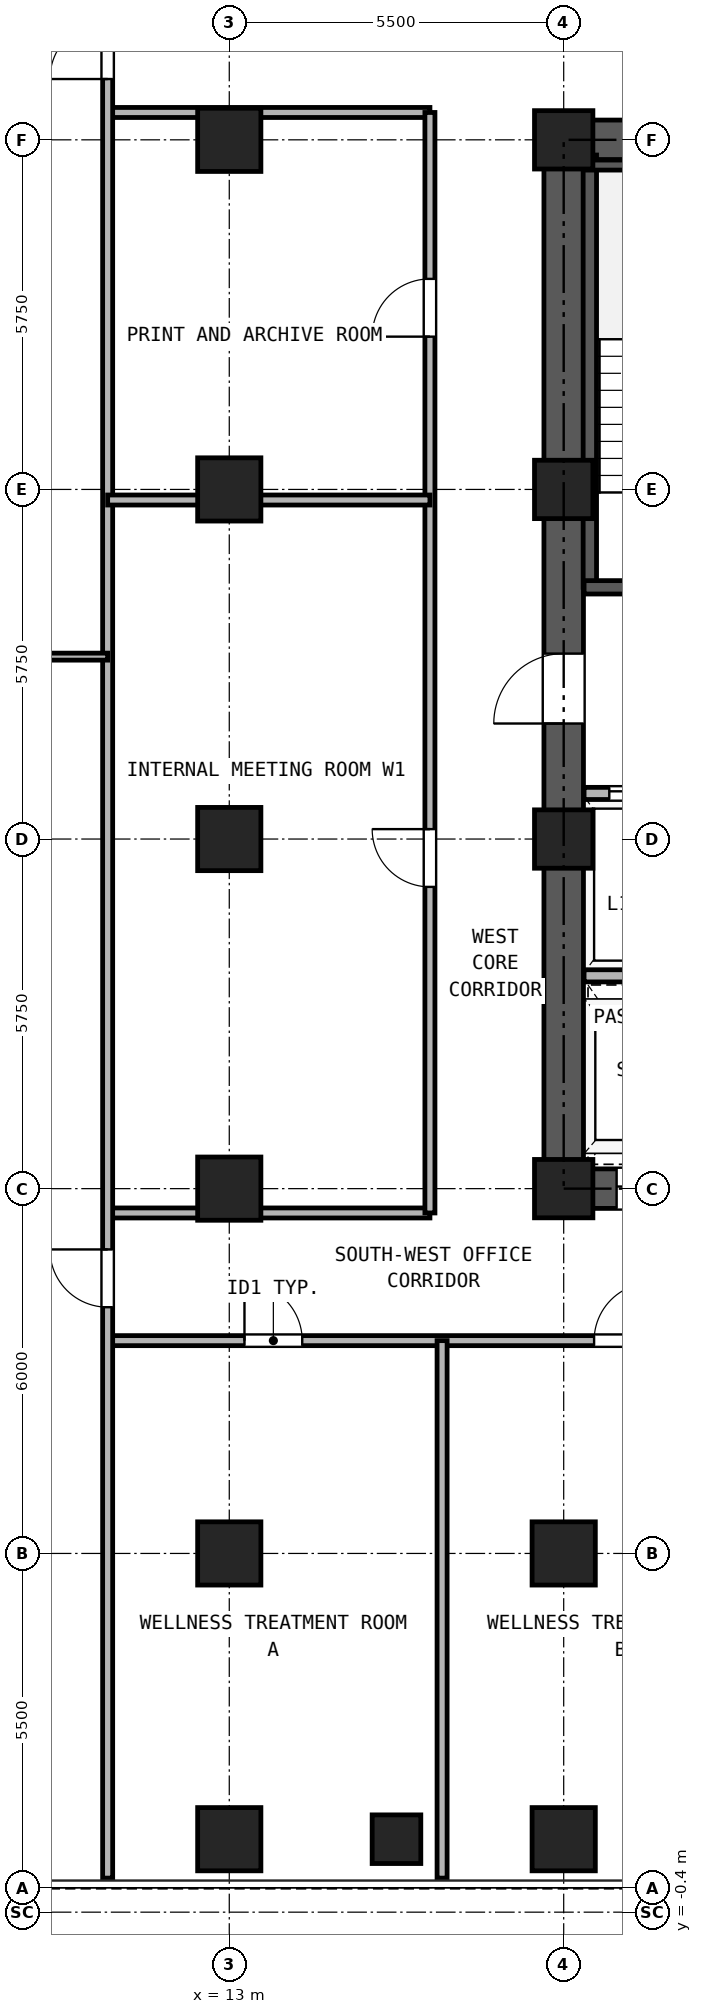
"""IFC4 building model, lengths in metres.
Left out: names, types, materials, properties, quantities, classifications, styles, units other than length and angle.
Written with IfcOpenShell. Run it as: python <this file> out.ifc"""

import sys

from ifc_helpers import new_model, si_unit, direction, frame, frame_2d, origin, origin_2d, place, context, subcontext, project, spatial, rectangle, hollow_rectangle, extrude, source, transform, mapped, element, fill, save


model = new_model("IFC4")
c1 = context("Model", 3, precision=1e-05, world=origin(), true_north=direction((0.0, 1.0)))
c2 = subcontext(c1, "Body", "Model", "MODEL_VIEW")
j1 = project(units=[si_unit("LENGTHUNIT", "METRE"), si_unit("PLANEANGLEUNIT", "RADIAN")], contexts=[c1])
p1 = place(None, origin())
s1 = spatial("IfcSite", under=j1, at=p1, CompositionType="ELEMENT")
p2 = place(p1, origin())
s2 = spatial("IfcBuilding", under=s1, at=p2, CompositionType="ELEMENT")
p3 = place(p2, frame((0.0, 0.0, 72.9)))
s3 = spatial("IfcBuildingStorey", under=s2, at=p3, CompositionType="ELEMENT", Elevation=72.9)
m1 = source(origin(), c2, "Body", "SweptSolid", [
    extrude(hollow_rectangle(XDim=1.04, YDim=1.04, WallThickness=0.065, at=origin_2d()), origin(), (0.0, 0.0, 1.0), 3.24),
])
for number, where, z_axis, x_axis in (
    (1, (13.0, 0.8, 0.0), (0.0, 0.0, 1.0), (1.0, 0.0, 0.0)),
    (2, (18.5, 0.8, 0.0), (0.0, 0.0, 1.0), (1.0, 0.0, 0.0)),
    (3, (13.0, 5.5, 0.0), (0.0, 0.0, 1.0), (1.0, 0.0, 0.0)),
    (4, (13.0, 11.5, 0.0), (0.0, 0.0, 1.0), (1.0, 0.0, 0.0)),
    (5, (13.0, 17.25, 0.0), (0.0, 0.0, 1.0), (1.0, 0.0, 0.0)),
    (6, (13.0, 23.0, 0.0), (0.0, 0.0, 1.0), (1.0, 0.0, 0.0)),
    (7, (13.0, 28.75, 0.0), (0.0, 0.0, 1.0), (1.0, 0.0, 0.0)),
    (8, (18.5, 5.5, 0.0), (0.0, 0.0, 1.0), (1.0, 0.0, 0.0)),
):
    element("IfcColumn", number, at=place(p3, frame(where, z_axis=z_axis, x_axis=x_axis)), inside=s3, PredefinedType="COLUMN", context=c2, shape_type="MappedRepresentation", body=[
        mapped(m1, transform((0.0, 0.0, 0.0), x_axis=(1.0, 0.0, 0.0), y_axis=(0.0, 1.0, 0.0), z_axis=(0.0, 0.0, 1.0), scale=1.0)),
    ])
m2 = source(origin(), c2, "Body", "SweptSolid", [
    extrude(hollow_rectangle(XDim=0.96, YDim=0.96, WallThickness=0.06, at=origin_2d()), origin(), (0.0, 0.0, 1.0), 3.24),
])
for number, where, z_axis, x_axis in (
    (9, (18.5, 11.5, 0.0), (0.0, 0.0, 1.0), (1.0, 0.0, 0.0)),
    (10, (18.5, 17.25, 0.0), (0.0, 0.0, 1.0), (1.0, 0.0, 0.0)),
    (11, (18.5, 23.0, 0.0), (0.0, 0.0, 1.0), (1.0, 0.0, 0.0)),
    (12, (18.5, 28.75, 0.0), (0.0, 0.0, 1.0), (1.0, 0.0, 0.0)),
):
    element("IfcColumn", number, at=place(p3, frame(where, z_axis=z_axis, x_axis=x_axis)), inside=s3, PredefinedType="COLUMN", context=c2, shape_type="MappedRepresentation", body=[
        mapped(m2, transform((0.0, 0.0, 0.0), x_axis=(1.0, 0.0, 0.0), y_axis=(0.0, 1.0, 0.0), z_axis=(0.0, 0.0, 1.0), scale=1.0)),
    ])
m3 = source(origin(), c2, "Body", "SweptSolid", [
    extrude(hollow_rectangle(XDim=0.8, YDim=0.8, WallThickness=0.045, at=origin_2d()), origin(), (0.0, 0.0, 1.0), 3.24),
])
p4 = place(p3, frame((15.75, 0.8, 0.0), z_axis=(0.0, 0.0, 1.0), x_axis=(1.0, 0.0, 0.0)))
e13 = element("IfcColumn", 13, at=p4, inside=s3, PredefinedType="COLUMN", context=c2, shape_type="MappedRepresentation", body=[
    mapped(m3, transform((0.0, 0.0, 0.0), x_axis=(1.0, 0.0, 0.0), y_axis=(0.0, 1.0, 0.0), z_axis=(0.0, 0.0, 1.0), scale=1.0)),
])
p5 = place(p3, frame((18.175, 11.5, 0.0), z_axis=(0.0, 0.0, 1.0), x_axis=(1.0, 0.0, 0.0)))
e14 = element("IfcWall", 14, at=p5, inside=s3, PredefinedType="SHEAR", context=c2, shape_type="SweptSolid", body=[
    extrude(rectangle(XDim=10.65, YDim=0.65, at=frame_2d((5.325, 0.0))), origin(), (0.0, 0.0, 1.0), 3.24),
])
p6 = place(p5, frame((1.195, 0.0, 0.0)))
e15 = element("IfcOpeningElement", 15, at=p6, cuts=e14, PredefinedType="OPENING", context=c2, shape_type="SweptSolid", body=[
    extrude(rectangle(XDim=1.1, YDim=2.25, at=frame_2d((0.55, 1.125))), frame((0.0, 0.335, 0.0), z_axis=(0.0, -1.0, 0.0), x_axis=(1.0, 0.0, 0.0)), (0.0, 0.0, 1.0), 0.67),
])
p7 = place(p5, frame((3.495, 0.0, 0.0)))
e16 = element("IfcOpeningElement", 16, at=p7, cuts=e14, PredefinedType="OPENING", context=c2, shape_type="SweptSolid", body=[
    extrude(rectangle(XDim=1.1, YDim=2.25, at=frame_2d((0.55, 1.125))), frame((0.0, 0.335, 0.0), z_axis=(0.0, -1.0, 0.0), x_axis=(1.0, 0.0, 0.0)), (0.0, 0.0, 1.0), 0.67),
])
p8 = place(p5, frame((5.925, 0.0, 0.0)))
e17 = element("IfcOpeningElement", 17, at=p8, cuts=e14, PredefinedType="OPENING", context=c2, shape_type="SweptSolid", body=[
    extrude(rectangle(XDim=1.1, YDim=2.25, at=frame_2d((0.55, 1.125))), frame((0.0, 0.335, 0.0), z_axis=(0.0, -1.0, 0.0), x_axis=(1.0, 0.0, 0.0)), (0.0, 0.0, 1.0), 0.67),
])
p9 = place(p5, frame((8.325, 0.0, 0.0)))
e18 = element("IfcOpeningElement", 18, at=p9, cuts=e14, PredefinedType="OPENING", context=c2, shape_type="SweptSolid", body=[
    extrude(rectangle(XDim=1.1, YDim=2.25, at=frame_2d((0.55, 1.125))), frame((0.0, 0.335, 0.0), z_axis=(0.0, -1.0, 0.0), x_axis=(1.0, 0.0, 0.0)), (0.0, 0.0, 1.0), 0.67),
])
p10 = place(p3, frame((18.175, 28.75, 0.0), z_axis=(0.0, 0.0, 1.0), x_axis=(1.0, 0.0, 0.0)))
e19 = element("IfcWall", 19, at=p10, inside=s3, PredefinedType="SHEAR", context=c2, shape_type="SweptSolid", body=[
    extrude(rectangle(XDim=10.65, YDim=0.65, at=frame_2d((5.325, 0.0))), origin(), (0.0, 0.0, 1.0), 3.24),
])
p11 = place(p10, frame((4.205, 0.0, 0.0)))
e20 = element("IfcOpeningElement", 20, at=p11, cuts=e19, PredefinedType="OPENING", context=c2, shape_type="SweptSolid", body=[
    extrude(rectangle(XDim=0.9, YDim=2.05, at=frame_2d((0.45, 1.025))), frame((0.0, 0.335, 0.0), z_axis=(0.0, -1.0, 0.0), x_axis=(1.0, 0.0, 0.0)), (0.0, 0.0, 1.0), 0.67),
])
p12 = place(p10, frame((5.745, 0.0, 0.0)))
e21 = element("IfcOpeningElement", 21, at=p12, cuts=e19, PredefinedType="OPENING", context=c2, shape_type="SweptSolid", body=[
    extrude(rectangle(XDim=0.9, YDim=2.05, at=frame_2d((0.45, 1.025))), frame((0.0, 0.335, 0.0), z_axis=(0.0, -1.0, 0.0), x_axis=(1.0, 0.0, 0.0)), (0.0, 0.0, 1.0), 0.67),
])
p13 = place(p3, frame((18.5, 11.825, 0.0), z_axis=(0.0, 0.0, 1.0), x_axis=(0.0, 1.0, 0.0)))
e22 = element("IfcWall", 22, at=p13, inside=s3, PredefinedType="SHEAR", context=c2, shape_type="SweptSolid", body=[
    extrude(rectangle(XDim=16.6, YDim=0.65, at=frame_2d((8.3, 0.0))), origin(), (0.0, 0.0, 1.0), 3.24),
])
p14 = place(p13, frame((7.325, 0.0, 0.0)))
e23 = element("IfcOpeningElement", 23, at=p14, cuts=e22, PredefinedType="OPENING", context=c2, shape_type="SweptSolid", body=[
    extrude(rectangle(XDim=1.15, YDim=2.2, at=frame_2d((0.575, 1.1))), frame((0.0, 0.335, 0.0), z_axis=(0.0, -1.0, 0.0), x_axis=(1.0, 0.0, 0.0)), (0.0, 0.0, 1.0), 0.67),
])
p15 = place(p3, frame((18.93, 21.39, 0.0), z_axis=(0.0, 0.0, 1.0), x_axis=(0.0, 1.0, 0.0)))
e24 = element("IfcWall", 24, at=p15, inside=s3, PredefinedType="SOLIDWALL", context=c2, shape_type="SweptSolid", body=[
    extrude(rectangle(XDim=7.11, YDim=0.22, at=frame_2d((3.555, 0.0))), origin(), (0.0, 0.0, 1.0), 3.24),
])
p16 = place(p3, frame((18.835, 28.335, 0.0), z_axis=(0.0, 0.0, 1.0), x_axis=(1.0, 0.0, 0.0)))
e25 = element("IfcWall", 25, at=p16, inside=s3, PredefinedType="PARTITIONING", context=c2, shape_type="SweptSolid", body=[
    extrude(rectangle(XDim=3.275, YDim=0.165, at=frame_2d((1.638, 0.0))), origin(), (0.0, 0.0, 1.0), 3.24),
])
p17 = place(p3, frame((18.835, 21.39, 0.0), z_axis=(0.0, 0.0, 1.0), x_axis=(1.0, 0.0, 0.0)))
e26 = element("IfcWall", 26, at=p17, inside=s3, PredefinedType="SOLIDWALL", context=c2, shape_type="SweptSolid", body=[
    extrude(rectangle(XDim=6.295, YDim=0.22, at=frame_2d((3.147, 0.0))), origin(), (0.0, 0.0, 1.0), 3.24),
])
p18 = place(p17, frame((1.015, 0.0, 0.0)))
e27 = element("IfcOpeningElement", 27, at=p18, cuts=e26, PredefinedType="OPENING", context=c2, shape_type="SweptSolid", body=[
    extrude(rectangle(XDim=1.15, YDim=2.2, at=frame_2d((0.575, 1.1))), frame((0.0, 0.12, 0.0), z_axis=(0.0, -1.0, 0.0), x_axis=(1.0, 0.0, 0.0)), (0.0, 0.0, 1.0), 0.24),
])
p19 = place(p17, frame((4.745, 0.0, 0.0)))
e28 = element("IfcOpeningElement", 28, at=p19, cuts=e26, PredefinedType="OPENING", context=c2, shape_type="SweptSolid", body=[
    extrude(rectangle(XDim=1.1, YDim=2.25, at=frame_2d((0.55, 1.125))), frame((0.0, 0.12, 0.0), z_axis=(0.0, -1.0, 0.0), x_axis=(1.0, 0.0, 0.0)), (0.0, 0.0, 1.0), 0.24),
])
p20 = place(p3, frame((18.835, 18.0, 0.0), z_axis=(0.0, 0.0, 1.0), x_axis=(1.0, 0.0, 0.0)))
e29 = element("IfcWall", 29, at=p20, inside=s3, PredefinedType="PARTITIONING", context=c2, shape_type="SweptSolid", body=[
    extrude(rectangle(XDim=9.33, YDim=0.2, at=frame_2d((4.665, 0.0))), origin(), (0.0, 0.0, 1.0), 3.24),
])
p21 = place(p20, frame((0.415, 0.0, 0.0)))
e30 = element("IfcOpeningElement", 30, at=p21, cuts=e29, PredefinedType="OPENING", context=c2, shape_type="SweptSolid", body=[
    extrude(rectangle(XDim=1.3, YDim=2.3, at=frame_2d((0.65, 1.15))), frame((0.0, 0.11, 0.0), z_axis=(0.0, -1.0, 0.0), x_axis=(1.0, 0.0, 0.0)), (0.0, 0.0, 1.0), 0.22),
])
p22 = place(p20, frame((2.515, 0.0, 0.0)))
e31 = element("IfcOpeningElement", 31, at=p22, cuts=e29, PredefinedType="OPENING", context=c2, shape_type="SweptSolid", body=[
    extrude(rectangle(XDim=1.3, YDim=2.3, at=frame_2d((0.65, 1.15))), frame((0.0, 0.11, 0.0), z_axis=(0.0, -1.0, 0.0), x_axis=(1.0, 0.0, 0.0)), (0.0, 0.0, 1.0), 0.22),
])
p23 = place(p20, frame((4.935, 0.0, 0.0)))
e32 = element("IfcOpeningElement", 32, at=p23, cuts=e29, PredefinedType="OPENING", context=c2, shape_type="SweptSolid", body=[
    extrude(rectangle(XDim=0.9, YDim=2.05, at=frame_2d((0.45, 1.025))), frame((0.0, 0.11, 0.0), z_axis=(0.0, -1.0, 0.0), x_axis=(1.0, 0.0, 0.0)), (0.0, 0.0, 1.0), 0.22),
])
p24 = place(p20, frame((8.065, 0.0, 0.0)))
e33 = element("IfcOpeningElement", 33, at=p24, cuts=e29, PredefinedType="OPENING", context=c2, shape_type="SweptSolid", body=[
    extrude(rectangle(XDim=0.9, YDim=2.05, at=frame_2d((0.45, 1.025))), frame((0.0, 0.11, 0.0), z_axis=(0.0, -1.0, 0.0), x_axis=(1.0, 0.0, 0.0)), (0.0, 0.0, 1.0), 0.22),
])
p25 = place(p3, frame((18.835, 15.0, 0.0), z_axis=(0.0, 0.0, 1.0), x_axis=(1.0, 0.0, 0.0)))
e34 = element("IfcWall", 34, at=p25, inside=s3, PredefinedType="PARTITIONING", context=c2, shape_type="SweptSolid", body=[
    extrude(rectangle(XDim=9.33, YDim=0.2, at=frame_2d((4.665, 0.0))), origin(), (0.0, 0.0, 1.0), 3.24),
])
p26 = place(p3, frame((11.0, 9.0, 0.0), z_axis=(0.0, 0.0, 1.0), x_axis=(1.0, 0.0, 0.0)))
e35 = element("IfcWall", 35, at=p26, inside=s3, PredefinedType="PARTITIONING", context=c2, shape_type="SweptSolid", body=[
    extrude(rectangle(XDim=25.0, YDim=0.165, at=frame_2d((12.5, 0.0))), origin(), (0.0, 0.0, 1.0), 3.24),
])
p27 = place(p26, frame((2.25, 0.0, 0.0)))
e36 = element("IfcOpeningElement", 36, at=p27, cuts=e35, PredefinedType="OPENING", context=c2, shape_type="SweptSolid", body=[
    extrude(rectangle(XDim=0.95, YDim=2.15, at=frame_2d((0.475, 1.075))), frame((0.0, 0.093, 0.0), z_axis=(0.0, -1.0, 0.0), x_axis=(1.0, 0.0, 0.0)), (0.0, 0.0, 1.0), 0.185),
])
p28 = place(p26, frame((8.0, 0.0, 0.0)))
e37 = element("IfcOpeningElement", 37, at=p28, cuts=e35, PredefinedType="OPENING", context=c2, shape_type="SweptSolid", body=[
    extrude(rectangle(XDim=0.95, YDim=2.15, at=frame_2d((0.475, 1.075))), frame((0.0, 0.093, 0.0), z_axis=(0.0, -1.0, 0.0), x_axis=(1.0, 0.0, 0.0)), (0.0, 0.0, 1.0), 0.185),
])
p29 = place(p26, frame((14.0, 0.0, 0.0)))
e38 = element("IfcOpeningElement", 38, at=p29, cuts=e35, PredefinedType="OPENING", context=c2, shape_type="SweptSolid", body=[
    extrude(rectangle(XDim=0.95, YDim=2.15, at=frame_2d((0.475, 1.075))), frame((0.0, 0.093, 0.0), z_axis=(0.0, -1.0, 0.0), x_axis=(1.0, 0.0, 0.0)), (0.0, 0.0, 1.0), 0.185),
])
p30 = place(p26, frame((19.5, 0.0, 0.0)))
e39 = element("IfcOpeningElement", 39, at=p30, cuts=e35, PredefinedType="OPENING", context=c2, shape_type="SweptSolid", body=[
    extrude(rectangle(XDim=0.95, YDim=2.15, at=frame_2d((0.475, 1.075))), frame((0.0, 0.093, 0.0), z_axis=(0.0, -1.0, 0.0), x_axis=(1.0, 0.0, 0.0)), (0.0, 0.0, 1.0), 0.185),
])
p31 = place(p26, frame((23.25, 0.0, 0.0)))
e40 = element("IfcOpeningElement", 40, at=p31, cuts=e35, PredefinedType="OPENING", context=c2, shape_type="SweptSolid", body=[
    extrude(rectangle(XDim=0.92, YDim=2.1, at=frame_2d((0.46, 1.05))), frame((0.0, 0.093, 0.0), z_axis=(0.0, -1.0, 0.0), x_axis=(1.0, 0.0, 0.0)), (0.0, 0.0, 1.0), 0.185),
])
for number, where, z_axis, x_axis in (
    (41, (11.0, 11.1, 0.0), (0.0, 0.0, 1.0), (1.0, 0.0, 0.0)),
    (42, (11.0, 29.2, 0.0), (0.0, 0.0, 1.0), (1.0, 0.0, 0.0)),
):
    element("IfcWall", number, at=place(p3, frame(where, z_axis=z_axis, x_axis=x_axis)), inside=s3, PredefinedType="PARTITIONING", context=c2, shape_type="SweptSolid", body=[
        extrude(rectangle(XDim=5.3, YDim=0.165, at=frame_2d((2.65, 0.0))), origin(), (0.0, 0.0, 1.0), 3.24),
    ])
p32 = place(p3, frame((16.3, 11.1, 0.0), z_axis=(0.0, 0.0, 1.0), x_axis=(0.0, 1.0, 0.0)))
e43 = element("IfcWall", 43, at=p32, inside=s3, PredefinedType="PARTITIONING", context=c2, shape_type="SweptSolid", body=[
    extrude(rectangle(XDim=18.1, YDim=0.165, at=frame_2d((9.05, 0.0))), origin(), (0.0, 0.0, 1.0), 3.24),
])
p33 = place(p32, frame((5.363, 0.0, 0.0)))
e44 = element("IfcOpeningElement", 44, at=p33, cuts=e43, PredefinedType="OPENING", context=c2, shape_type="SweptSolid", body=[
    extrude(rectangle(XDim=0.95, YDim=2.15, at=frame_2d((0.475, 1.075))), frame((0.0, 0.093, 0.0), z_axis=(0.0, -1.0, 0.0), x_axis=(1.0, 0.0, 0.0)), (0.0, 0.0, 1.0), 0.185),
])
p34 = place(p32, frame((14.413, 0.0, 0.0)))
e45 = element("IfcOpeningElement", 45, at=p34, cuts=e43, PredefinedType="OPENING", context=c2, shape_type="SweptSolid", body=[
    extrude(rectangle(XDim=0.95, YDim=2.15, at=frame_2d((0.475, 1.075))), frame((0.0, 0.093, 0.0), z_axis=(0.0, -1.0, 0.0), x_axis=(1.0, 0.0, 0.0)), (0.0, 0.0, 1.0), 0.185),
])
p35 = place(p3, frame((11.0, 0.16, 0.0), z_axis=(0.0, 0.0, 1.0), x_axis=(0.0, 1.0, 0.0)))
e46 = element("IfcWall", 46, at=p35, inside=s3, PredefinedType="PARTITIONING", context=c2, shape_type="SweptSolid", body=[
    extrude(rectangle(XDim=40.18, YDim=0.165, at=frame_2d((20.09, 0.0))), origin(), (0.0, 0.0, 1.0), 3.24),
])
p36 = place(p35, frame((9.39, 0.0, 0.0)))
e47 = element("IfcOpeningElement", 47, at=p36, cuts=e46, PredefinedType="OPENING", context=c2, shape_type="SweptSolid", body=[
    extrude(rectangle(XDim=0.95, YDim=2.15, at=frame_2d((0.475, 1.075))), frame((0.0, 0.093, 0.0), z_axis=(0.0, -1.0, 0.0), x_axis=(1.0, 0.0, 0.0)), (0.0, 0.0, 1.0), 0.185),
])
p37 = place(p35, frame((29.59, 0.0, 0.0)))
e48 = element("IfcOpeningElement", 48, at=p37, cuts=e46, PredefinedType="OPENING", context=c2, shape_type="SweptSolid", body=[
    extrude(rectangle(XDim=0.95, YDim=2.15, at=frame_2d((0.475, 1.075))), frame((0.0, 0.093, 0.0), z_axis=(0.0, -1.0, 0.0), x_axis=(1.0, 0.0, 0.0)), (0.0, 0.0, 1.0), 0.185),
])
p38 = place(p3, frame((16.5, 0.16, 0.0), z_axis=(0.0, 0.0, 1.0), x_axis=(0.0, 1.0, 0.0)))
e49 = element("IfcWall", 49, at=p38, inside=s3, PredefinedType="PARTITIONING", context=c2, shape_type="SweptSolid", body=[
    extrude(rectangle(XDim=8.84, YDim=0.165, at=frame_2d((4.42, 0.0))), origin(), (0.0, 0.0, 1.0), 3.24),
])
p39 = place(p3, frame((0.16, 20.25, 0.0), z_axis=(0.0, 0.0, 1.0), x_axis=(1.0, 0.0, 0.0)))
e50 = element("IfcWall", 50, at=p39, inside=s3, PredefinedType="PARTITIONING", context=c2, shape_type="SweptSolid", body=[
    extrude(rectangle(XDim=10.84, YDim=0.115, at=frame_2d((5.42, 0.0))), origin(), (0.0, 0.0, 1.0), 2.818),
])
p40 = place(p3, frame((11.0, 22.826, 0.0), z_axis=(0.0, 0.0, 1.0), x_axis=(1.0, 0.0, 0.0)))
e51 = element("IfcWall", 51, at=p40, inside=s3, PredefinedType="PARTITIONING", context=c2, shape_type="SweptSolid", body=[
    extrude(rectangle(XDim=5.3, YDim=0.165, at=frame_2d((2.65, 0.0))), origin(), (0.0, 0.0, 1.0), 2.459),
])
p41 = place(p21, origin())
e52 = element("IfcDoor", 52, at=p41, inside=s3, OperationType="DOUBLE_DOOR_SLIDING", PredefinedType="DOOR", context=c2, shape_type="SweptSolid", body=[
    extrude(rectangle(XDim=1.3, YDim=2.3, at=frame_2d((0.65, 1.15))), frame((0.0, 0.025, 0.0), z_axis=(0.0, -1.0, 0.0), x_axis=(1.0, 0.0, 0.0)), (0.0, 0.0, 1.0), 0.05),
])
fill(e30, e52)
p42 = place(p14, frame((1.15, 0.0, 0.0), z_axis=(0.0, 0.0, 1.0), x_axis=(-1.0, 0.0, 0.0)))
e53 = element("IfcDoor", 53, at=p42, inside=s3, OperationType="SINGLE_SWING_LEFT", PredefinedType="DOOR", context=c2, shape_type="SweptSolid", body=[
    extrude(rectangle(XDim=1.15, YDim=2.2, at=frame_2d((0.575, 1.1))), frame((0.0, 0.025, 0.0), z_axis=(0.0, -1.0, 0.0), x_axis=(1.0, 0.0, 0.0)), (0.0, 0.0, 1.0), 0.05),
])
fill(e23, e53)
p43 = place(p6, frame((1.1, 0.0, 0.0), z_axis=(0.0, 0.0, 1.0), x_axis=(-1.0, 0.0, 0.0)))
e54 = element("IfcDoor", 54, at=p43, inside=s3, OperationType="DOUBLE_DOOR_SLIDING", PredefinedType="DOOR", context=c2, shape_type="SweptSolid", body=[
    extrude(rectangle(XDim=1.1, YDim=2.25, at=frame_2d((0.55, 1.125))), frame((0.0, 0.025, 0.0), z_axis=(0.0, -1.0, 0.0), x_axis=(1.0, 0.0, 0.0)), (0.0, 0.0, 1.0), 0.05),
])
fill(e15, e54)
p44 = place(p27, frame((0.95, 0.0, 0.0), z_axis=(0.0, 0.0, 1.0), x_axis=(-1.0, 0.0, 0.0)))
e55 = element("IfcDoor", 55, at=p44, inside=s3, OperationType="SINGLE_SWING_LEFT", PredefinedType="DOOR", context=c2, shape_type="SweptSolid", body=[
    extrude(rectangle(XDim=0.95, YDim=2.15, at=frame_2d((0.475, 1.075))), frame((0.0, 0.025, 0.0), z_axis=(0.0, -1.0, 0.0), x_axis=(1.0, 0.0, 0.0)), (0.0, 0.0, 1.0), 0.05),
])
fill(e36, e55)
p45 = place(p28, frame((0.95, 0.0, 0.0), z_axis=(0.0, 0.0, 1.0), x_axis=(-1.0, 0.0, 0.0)))
e56 = element("IfcDoor", 56, at=p45, inside=s3, OperationType="SINGLE_SWING_RIGHT", PredefinedType="DOOR", context=c2, shape_type="SweptSolid", body=[
    extrude(rectangle(XDim=0.95, YDim=2.15, at=frame_2d((0.475, 1.075))), frame((0.0, 0.025, 0.0), z_axis=(0.0, -1.0, 0.0), x_axis=(1.0, 0.0, 0.0)), (0.0, 0.0, 1.0), 0.05),
])
fill(e37, e56)
p46 = place(p36, frame((0.95, 0.0, 0.0), z_axis=(0.0, 0.0, 1.0), x_axis=(-1.0, 0.0, 0.0)))
e57 = element("IfcDoor", 57, at=p46, inside=s3, OperationType="SINGLE_SWING_RIGHT", PredefinedType="DOOR", context=c2, shape_type="SweptSolid", body=[
    extrude(rectangle(XDim=0.95, YDim=2.15, at=frame_2d((0.475, 1.075))), frame((0.0, 0.025, 0.0), z_axis=(0.0, -1.0, 0.0), x_axis=(1.0, 0.0, 0.0)), (0.0, 0.0, 1.0), 0.05),
])
fill(e47, e57)
p47 = place(p37, frame((0.95, 0.0, 0.0), z_axis=(0.0, 0.0, 1.0), x_axis=(-1.0, 0.0, 0.0)))
e58 = element("IfcDoor", 58, at=p47, inside=s3, OperationType="SINGLE_SWING_LEFT", PredefinedType="DOOR", context=c2, shape_type="SweptSolid", body=[
    extrude(rectangle(XDim=0.95, YDim=2.15, at=frame_2d((0.475, 1.075))), frame((0.0, 0.025, 0.0), z_axis=(0.0, -1.0, 0.0), x_axis=(1.0, 0.0, 0.0)), (0.0, 0.0, 1.0), 0.05),
])
fill(e48, e58)
p48 = place(p33, frame((0.95, 0.0, 0.0), z_axis=(0.0, 0.0, 1.0), x_axis=(-1.0, 0.0, 0.0)))
e59 = element("IfcDoor", 59, at=p48, inside=s3, OperationType="SINGLE_SWING_RIGHT", PredefinedType="DOOR", context=c2, shape_type="SweptSolid", body=[
    extrude(rectangle(XDim=0.95, YDim=2.15, at=frame_2d((0.475, 1.075))), frame((0.0, 0.025, 0.0), z_axis=(0.0, -1.0, 0.0), x_axis=(1.0, 0.0, 0.0)), (0.0, 0.0, 1.0), 0.05),
])
fill(e44, e59)
p49 = place(p34, frame((0.95, 0.0, 0.0), z_axis=(0.0, 0.0, 1.0), x_axis=(-1.0, 0.0, 0.0)))
e60 = element("IfcDoor", 60, at=p49, inside=s3, OperationType="SINGLE_SWING_LEFT", PredefinedType="DOOR", context=c2, shape_type="SweptSolid", body=[
    extrude(rectangle(XDim=0.95, YDim=2.15, at=frame_2d((0.475, 1.075))), frame((0.0, 0.025, 0.0), z_axis=(0.0, -1.0, 0.0), x_axis=(1.0, 0.0, 0.0)), (0.0, 0.0, 1.0), 0.05),
])
fill(e45, e60)
save(model, sys.argv[1])
